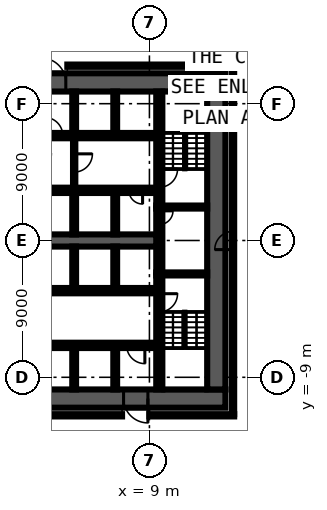
"""IFC4 building model, lengths in metres.
Left out: names, types, materials, properties, quantities, classifications, styles, units other than length and angle.
Written with IfcOpenShell. Run it as: python <this file> out.ifc"""

import sys

from ifc_helpers import new_model, si_unit, direction, frame, frame_2d, origin, place, context, subcontext, project, spatial, rectangle, extrude, element, fill, save


model = new_model("IFC4")
c1 = context("Model", 3, precision=1e-05, world=origin(), true_north=direction((0.0, 1.0)))
c2 = subcontext(c1, "Body", "Model", "MODEL_VIEW")
j1 = project(units=[si_unit("LENGTHUNIT", "METRE"), si_unit("PLANEANGLEUNIT", "RADIAN")], contexts=[c1])
p1 = place(None, origin())
s1 = spatial("IfcSite", under=j1, at=p1, CompositionType="ELEMENT")
p2 = place(p1, origin())
s2 = spatial("IfcBuilding", under=s1, at=p2, CompositionType="ELEMENT")
p3 = place(p2, frame((0.0, 0.0, -11.5)))
s3 = spatial("IfcBuildingStorey", under=s2, at=p3, CompositionType="ELEMENT", Elevation=-11.5)
p4 = place(p3, frame((-14.575, -11.5, 0.0), z_axis=(0.0, 0.0, 1.0), x_axis=(1.0, 0.0, 0.0)))
e1 = element("IfcWall", 1, at=p4, inside=s3, PredefinedType="PARTITIONING", context=c2, shape_type="SweptSolid", body=[
    extrude(rectangle(XDim=21.775, YDim=0.15, at=frame_2d((10.887, 0.0))), origin(), (0.0, 0.0, 1.0), 5.1),
])
p5 = place(p3, frame((9.0, -11.5, 0.0), z_axis=(0.0, 0.0, 1.0), x_axis=(1.0, 0.0, 0.0)))
e2 = element("IfcWall", 2, at=p5, inside=s3, PredefinedType="PARTITIONING", context=c2, shape_type="SweptSolid", body=[
    extrude(rectangle(XDim=5.575, YDim=0.15, at=frame_2d((2.788, 0.0))), origin(), (0.0, 0.0, 1.0), 5.1),
])
p6 = place(p3, frame((3.6, 11.5, 0.0), z_axis=(0.0, 0.0, 1.0), x_axis=(1.0, 0.0, 0.0)))
e3 = element("IfcWall", 3, at=p6, inside=s3, PredefinedType="PARTITIONING", context=c2, shape_type="SweptSolid", body=[
    extrude(rectangle(XDim=10.975, YDim=0.15, at=frame_2d((5.487, 0.0))), origin(), (0.0, 0.0, 1.0), 5.1),
])
p7 = place(p3, frame((14.5, -11.425, 0.0), z_axis=(0.0, 0.0, 1.0), x_axis=(0.0, 1.0, 0.0)))
e4 = element("IfcWall", 4, at=p7, inside=s3, PredefinedType="PARTITIONING", context=c2, shape_type="SweptSolid", body=[
    extrude(rectangle(XDim=22.85, YDim=0.15, at=frame_2d((11.425, 0.0))), origin(), (0.0, 0.0, 1.0), 5.1),
])
p8 = place(p7, frame((10.825, 0.0, 0.0)))
e5 = element("IfcOpeningElement", 5, at=p8, cuts=e4, PredefinedType="OPENING", context=c2, shape_type="SweptSolid", body=[
    extrude(rectangle(XDim=1.2, YDim=2.1, at=frame_2d((0.6, 1.05))), frame((0.0, 0.085, 0.0), z_axis=(0.0, -1.0, 0.0), x_axis=(1.0, 0.0, 0.0)), (0.0, 0.0, 1.0), 0.17),
])
p9 = place(p3, frame((-14.0, 10.4, 0.0), z_axis=(0.0, 0.0, 1.0), x_axis=(1.0, 0.0, 0.0)))
e6 = element("IfcWall", 6, at=p9, inside=s3, PredefinedType="SHEAR", context=c2, shape_type="SweptSolid", body=[
    extrude(rectangle(XDim=28.0, YDim=1.2, at=frame_2d((14.0, 0.0))), origin(), (0.0, 0.0, 1.0), 5.1),
])
p10 = place(p9, frame((15.9, 0.0, 0.0)))
e7 = element("IfcOpeningElement", 7, at=p10, cuts=e6, PredefinedType="OPENING", context=c2, shape_type="SweptSolid", body=[
    extrude(rectangle(XDim=1.6, YDim=2.1, at=frame_2d((0.8, 1.05))), frame((0.0, 0.61, 0.0), z_axis=(0.0, -1.0, 0.0), x_axis=(1.0, 0.0, 0.0)), (0.0, 0.0, 1.0), 1.22),
])
p11 = place(p3, frame((14.0, -10.4, 0.0), z_axis=(0.0, 0.0, 1.0), x_axis=(-1.0, 0.0, 0.0)))
e8 = element("IfcWall", 8, at=p11, inside=s3, PredefinedType="SHEAR", context=c2, shape_type="SweptSolid", body=[
    extrude(rectangle(XDim=28.0, YDim=1.2, at=frame_2d((14.0, 0.0))), origin(), (0.0, 0.0, 1.0), 5.1),
])
p12 = place(p11, frame((5.1, 0.0, 0.0)))
e9 = element("IfcOpeningElement", 9, at=p12, cuts=e8, PredefinedType="OPENING", context=c2, shape_type="SweptSolid", body=[
    extrude(rectangle(XDim=1.6, YDim=2.1, at=frame_2d((0.8, 1.05))), frame((0.0, 0.61, 0.0), z_axis=(0.0, -1.0, 0.0), x_axis=(1.0, 0.0, 0.0)), (0.0, 0.0, 1.0), 1.22),
])
p13 = place(p3, frame((13.4, 9.8, 0.0), z_axis=(0.0, 0.0, 1.0), x_axis=(0.0, -1.0, 0.0)))
e10 = element("IfcWall", 10, at=p13, inside=s3, PredefinedType="SHEAR", context=c2, shape_type="SweptSolid", body=[
    extrude(rectangle(XDim=19.6, YDim=1.2, at=frame_2d((9.8, 0.0))), origin(), (0.0, 0.0, 1.0), 5.1),
])
p14 = place(p3, frame((9.65, -2.3, 0.0), z_axis=(0.0, 0.0, 1.0), x_axis=(0.0, -1.0, 0.0)))
e11 = element("IfcWall", 11, at=p14, inside=s3, PredefinedType="SHEAR", context=c2, shape_type="SweptSolid", body=[
    extrude(rectangle(XDim=7.5, YDim=0.4, at=frame_2d((3.75, 0.0))), origin(), (0.0, 0.0, 1.0), 5.1),
])
p15 = place(p14, frame((1.2, 0.0, 0.0)))
e12 = element("IfcOpeningElement", 12, at=p15, cuts=e11, PredefinedType="OPENING", context=c2, shape_type="SweptSolid", body=[
    extrude(rectangle(XDim=1.2, YDim=2.1, at=frame_2d((0.6, 1.05))), frame((0.0, 0.21, 0.0), z_axis=(0.0, -1.0, 0.0), x_axis=(1.0, 0.0, 0.0)), (0.0, 0.0, 1.0), 0.42),
])
p16 = place(p3, frame((9.65, 2.1, 0.0), z_axis=(0.0, 0.0, 1.0), x_axis=(0.0, -1.0, 0.0)))
e13 = element("IfcWall", 13, at=p16, inside=s3, PredefinedType="SHEAR", context=c2, shape_type="SweptSolid", body=[
    extrude(rectangle(XDim=4.2, YDim=0.4, at=frame_2d((2.1, 0.0))), origin(), (0.0, 0.0, 1.0), 5.1),
])
p17 = place(p16, frame((0.15, 0.0, 0.0)))
e14 = element("IfcOpeningElement", 14, at=p17, cuts=e13, PredefinedType="OPENING", context=c2, shape_type="SweptSolid", body=[
    extrude(rectangle(XDim=0.9, YDim=2.1, at=frame_2d((0.45, 1.05))), frame((0.0, 0.21, 0.0), z_axis=(0.0, -1.0, 0.0), x_axis=(1.0, 0.0, 0.0)), (0.0, 0.0, 1.0), 0.42),
])
p18 = place(p3, frame((9.65, 9.8, 0.0), z_axis=(0.0, 0.0, 1.0), x_axis=(0.0, -1.0, 0.0)))
e15 = element("IfcWall", 15, at=p18, inside=s3, PredefinedType="SHEAR", context=c2, shape_type="SweptSolid", body=[
    extrude(rectangle(XDim=7.5, YDim=0.4, at=frame_2d((3.75, 0.0))), origin(), (0.0, 0.0, 1.0), 5.1),
])
p19 = place(p18, frame((5.1, 0.0, 0.0)))
e16 = element("IfcOpeningElement", 16, at=p19, cuts=e15, PredefinedType="OPENING", context=c2, shape_type="SweptSolid", body=[
    extrude(rectangle(XDim=1.2, YDim=2.1, at=frame_2d((0.6, 1.05))), frame((0.0, 0.21, 0.0), z_axis=(0.0, -1.0, 0.0), x_axis=(1.0, 0.0, 0.0)), (0.0, 0.0, 1.0), 0.42),
])
for number, where, z_axis, x_axis in (
    (17, (9.45, 2.2, 0.0), (0.0, 0.0, 1.0), (1.0, 0.0, 0.0)),
    (18, (9.45, -2.2, 0.0), (0.0, 0.0, 1.0), (1.0, 0.0, 0.0)),
):
    element("IfcWall", number, at=place(p3, frame(where, z_axis=z_axis, x_axis=x_axis)), inside=s3, PredefinedType="SHEAR", context=c2, shape_type="SweptSolid", body=[
        extrude(rectangle(XDim=3.35, YDim=0.2, at=frame_2d((1.675, 0.0))), origin(), (0.0, 0.0, 1.0), 5.1),
    ])
p20 = place(p3, frame((-9.45, 6.9, 0.0), z_axis=(0.0, 0.0, 1.0), x_axis=(1.0, 0.0, 0.0)))
e19 = element("IfcWall", 19, at=p20, inside=s3, PredefinedType="SHEAR", context=c2, shape_type="SweptSolid", body=[
    extrude(rectangle(XDim=18.9, YDim=0.35, at=frame_2d((9.45, 0.0))), origin(), (0.0, 0.0, 1.0), 5.1),
])
p21 = place(p20, frame((0.8, 0.0, 0.0)))
e20 = element("IfcOpeningElement", 20, at=p21, cuts=e19, PredefinedType="OPENING", context=c2, shape_type="SweptSolid", body=[
    extrude(rectangle(XDim=1.1, YDim=2.1, at=frame_2d((0.55, 1.05))), frame((0.0, 0.185, 0.0), z_axis=(0.0, -1.0, 0.0), x_axis=(1.0, 0.0, 0.0)), (0.0, 0.0, 1.0), 0.37),
])
p22 = place(p20, frame((3.5, 0.0, 0.0)))
e21 = element("IfcOpeningElement", 21, at=p22, cuts=e19, PredefinedType="OPENING", context=c2, shape_type="SweptSolid", body=[
    extrude(rectangle(XDim=1.1, YDim=2.1, at=frame_2d((0.55, 1.05))), frame((0.0, 0.185, 0.0), z_axis=(0.0, -1.0, 0.0), x_axis=(1.0, 0.0, 0.0)), (0.0, 0.0, 1.0), 0.37),
])
p23 = place(p20, frame((6.2, 0.0, 0.0)))
e22 = element("IfcOpeningElement", 22, at=p23, cuts=e19, PredefinedType="OPENING", context=c2, shape_type="SweptSolid", body=[
    extrude(rectangle(XDim=1.1, YDim=2.1, at=frame_2d((0.55, 1.05))), frame((0.0, 0.185, 0.0), z_axis=(0.0, -1.0, 0.0), x_axis=(1.0, 0.0, 0.0)), (0.0, 0.0, 1.0), 0.37),
])
p24 = place(p20, frame((8.9, 0.0, 0.0)))
e23 = element("IfcOpeningElement", 23, at=p24, cuts=e19, PredefinedType="OPENING", context=c2, shape_type="SweptSolid", body=[
    extrude(rectangle(XDim=1.1, YDim=2.1, at=frame_2d((0.55, 1.05))), frame((0.0, 0.185, 0.0), z_axis=(0.0, -1.0, 0.0), x_axis=(1.0, 0.0, 0.0)), (0.0, 0.0, 1.0), 0.37),
])
p25 = place(p20, frame((11.55, 0.0, 0.0)))
e24 = element("IfcOpeningElement", 24, at=p25, cuts=e19, PredefinedType="OPENING", context=c2, shape_type="SweptSolid", body=[
    extrude(rectangle(XDim=1.2, YDim=2.1, at=frame_2d((0.6, 1.05))), frame((0.0, 0.185, 0.0), z_axis=(0.0, -1.0, 0.0), x_axis=(1.0, 0.0, 0.0)), (0.0, 0.0, 1.0), 0.37),
])
p26 = place(p20, frame((14.3, 0.0, 0.0)))
e25 = element("IfcOpeningElement", 25, at=p26, cuts=e19, PredefinedType="OPENING", context=c2, shape_type="SweptSolid", body=[
    extrude(rectangle(XDim=1.1, YDim=2.1, at=frame_2d((0.55, 1.05))), frame((0.0, 0.185, 0.0), z_axis=(0.0, -1.0, 0.0), x_axis=(1.0, 0.0, 0.0)), (0.0, 0.0, 1.0), 0.37),
])
p27 = place(p20, frame((17.0, 0.0, 0.0)))
e26 = element("IfcOpeningElement", 26, at=p27, cuts=e19, PredefinedType="OPENING", context=c2, shape_type="SweptSolid", body=[
    extrude(rectangle(XDim=1.1, YDim=2.1, at=frame_2d((0.55, 1.05))), frame((0.0, 0.185, 0.0), z_axis=(0.0, -1.0, 0.0), x_axis=(1.0, 0.0, 0.0)), (0.0, 0.0, 1.0), 0.37),
])
p28 = place(p3, frame((9.45, 3.3, 0.0), z_axis=(0.0, 0.0, 1.0), x_axis=(-1.0, 0.0, 0.0)))
e27 = element("IfcWall", 27, at=p28, inside=s3, PredefinedType="SHEAR", context=c2, shape_type="SweptSolid", body=[
    extrude(rectangle(XDim=18.9, YDim=0.35, at=frame_2d((9.45, 0.0))), origin(), (0.0, 0.0, 1.0), 5.1),
])
p29 = place(p28, frame((6.2, 0.0, 0.0)))
e28 = element("IfcOpeningElement", 28, at=p29, cuts=e27, PredefinedType="OPENING", context=c2, shape_type="SweptSolid", body=[
    extrude(rectangle(XDim=1.1, YDim=2.1, at=frame_2d((0.55, 1.05))), frame((0.0, 0.185, 0.0), z_axis=(0.0, -1.0, 0.0), x_axis=(1.0, 0.0, 0.0)), (0.0, 0.0, 1.0), 0.37),
])
p30 = place(p28, frame((3.5, 0.0, 0.0)))
e29 = element("IfcOpeningElement", 29, at=p30, cuts=e27, PredefinedType="OPENING", context=c2, shape_type="SweptSolid", body=[
    extrude(rectangle(XDim=1.1, YDim=2.1, at=frame_2d((0.55, 1.05))), frame((0.0, 0.185, 0.0), z_axis=(0.0, -1.0, 0.0), x_axis=(1.0, 0.0, 0.0)), (0.0, 0.0, 1.0), 0.37),
])
p31 = place(p28, frame((0.9, 0.0, 0.0)))
e30 = element("IfcOpeningElement", 30, at=p31, cuts=e27, PredefinedType="OPENING", context=c2, shape_type="SweptSolid", body=[
    extrude(rectangle(XDim=0.9, YDim=2.1, at=frame_2d((0.45, 1.05))), frame((0.0, 0.185, 0.0), z_axis=(0.0, -1.0, 0.0), x_axis=(1.0, 0.0, 0.0)), (0.0, 0.0, 1.0), 0.37),
])
p32 = place(p3, frame((-9.45, -3.3, 0.0), z_axis=(0.0, 0.0, 1.0), x_axis=(1.0, 0.0, 0.0)))
e31 = element("IfcWall", 31, at=p32, inside=s3, PredefinedType="SHEAR", context=c2, shape_type="SweptSolid", body=[
    extrude(rectangle(XDim=18.9, YDim=0.35, at=frame_2d((9.45, 0.0))), origin(), (0.0, 0.0, 1.0), 5.1),
])
p33 = place(p32, frame((17.0, 0.0, 0.0)))
e32 = element("IfcOpeningElement", 32, at=p33, cuts=e31, PredefinedType="OPENING", context=c2, shape_type="SweptSolid", body=[
    extrude(rectangle(XDim=1.1, YDim=2.1, at=frame_2d((0.55, 1.05))), frame((0.0, 0.185, 0.0), z_axis=(0.0, -1.0, 0.0), x_axis=(1.0, 0.0, 0.0)), (0.0, 0.0, 1.0), 0.37),
])
p34 = place(p32, frame((0.9, 0.0, 0.0)))
e33 = element("IfcOpeningElement", 33, at=p34, cuts=e31, PredefinedType="OPENING", context=c2, shape_type="SweptSolid", body=[
    extrude(rectangle(XDim=0.9, YDim=2.1, at=frame_2d((0.45, 1.05))), frame((0.0, 0.185, 0.0), z_axis=(0.0, -1.0, 0.0), x_axis=(1.0, 0.0, 0.0)), (0.0, 0.0, 1.0), 0.37),
])
p35 = place(p32, frame((3.6, 0.0, 0.0)))
e34 = element("IfcOpeningElement", 34, at=p35, cuts=e31, PredefinedType="OPENING", context=c2, shape_type="SweptSolid", body=[
    extrude(rectangle(XDim=0.9, YDim=2.1, at=frame_2d((0.45, 1.05))), frame((0.0, 0.185, 0.0), z_axis=(0.0, -1.0, 0.0), x_axis=(1.0, 0.0, 0.0)), (0.0, 0.0, 1.0), 0.37),
])
p36 = place(p32, frame((7.65, 0.0, 0.0)))
e35 = element("IfcOpeningElement", 35, at=p36, cuts=e31, PredefinedType="OPENING", context=c2, shape_type="SweptSolid", body=[
    extrude(rectangle(XDim=0.9, YDim=2.1, at=frame_2d((0.45, 1.05))), frame((0.0, 0.185, 0.0), z_axis=(0.0, -1.0, 0.0), x_axis=(1.0, 0.0, 0.0)), (0.0, 0.0, 1.0), 0.37),
])
p37 = place(p3, frame((9.45, -6.9, 0.0), z_axis=(0.0, 0.0, 1.0), x_axis=(-1.0, 0.0, 0.0)))
e36 = element("IfcWall", 36, at=p37, inside=s3, PredefinedType="SHEAR", context=c2, shape_type="SweptSolid", body=[
    extrude(rectangle(XDim=18.9, YDim=0.35, at=frame_2d((9.45, 0.0))), origin(), (0.0, 0.0, 1.0), 5.1),
])
p38 = place(p37, frame((0.75, 0.0, 0.0)))
e37 = element("IfcOpeningElement", 37, at=p38, cuts=e36, PredefinedType="OPENING", context=c2, shape_type="SweptSolid", body=[
    extrude(rectangle(XDim=1.2, YDim=2.1, at=frame_2d((0.6, 1.05))), frame((0.0, 0.185, 0.0), z_axis=(0.0, -1.0, 0.0), x_axis=(1.0, 0.0, 0.0)), (0.0, 0.0, 1.0), 0.37),
])
p39 = place(p37, frame((14.4, 0.0, 0.0)))
e38 = element("IfcOpeningElement", 38, at=p39, cuts=e36, PredefinedType="OPENING", context=c2, shape_type="SweptSolid", body=[
    extrude(rectangle(XDim=0.9, YDim=2.1, at=frame_2d((0.45, 1.05))), frame((0.0, 0.185, 0.0), z_axis=(0.0, -1.0, 0.0), x_axis=(1.0, 0.0, 0.0)), (0.0, 0.0, 1.0), 0.37),
])
p40 = place(p37, frame((9.0, 0.0, 0.0)))
e39 = element("IfcOpeningElement", 39, at=p40, cuts=e36, PredefinedType="OPENING", context=c2, shape_type="SweptSolid", body=[
    extrude(rectangle(XDim=0.9, YDim=2.1, at=frame_2d((0.45, 1.05))), frame((0.0, 0.185, 0.0), z_axis=(0.0, -1.0, 0.0), x_axis=(1.0, 0.0, 0.0)), (0.0, 0.0, 1.0), 0.37),
])
p41 = place(p3, frame((-9.45, 0.0, 0.0), z_axis=(0.0, 0.0, 1.0), x_axis=(1.0, 0.0, 0.0)))
e40 = element("IfcWall", 40, at=p41, inside=s3, PredefinedType="SHEAR", context=c2, shape_type="SweptSolid", body=[
    extrude(rectangle(XDim=18.9, YDim=0.8, at=frame_2d((9.45, 0.0))), origin(), (0.0, 0.0, 1.0), 5.1),
])
for number, where, z_axis, x_axis in (
    (41, (6.75, -9.8, 0.0), (0.0, 0.0, 1.0), (0.0, 1.0, 0.0)),
    (42, (6.75, -3.125, 0.0), (0.0, 0.0, 1.0), (0.0, 1.0, 0.0)),
):
    element("IfcWall", number, at=place(p3, frame(where, z_axis=z_axis, x_axis=x_axis)), inside=s3, PredefinedType="SHEAR", context=c2, shape_type="SweptSolid", body=[
        extrude(rectangle(XDim=2.725, YDim=0.25, at=frame_2d((1.363, 0.0))), origin(), (0.0, 0.0, 1.0), 5.1),
    ])
for number, where, z_axis, x_axis in (
    (43, (6.75, 0.4, 0.0), (0.0, 0.0, 1.0), (0.0, 1.0, 0.0)),
    (44, (6.75, 7.075, 0.0), (0.0, 0.0, 1.0), (0.0, 1.0, 0.0)),
):
    element("IfcWall", number, at=place(p3, frame(where, z_axis=z_axis, x_axis=x_axis)), inside=s3, PredefinedType="SOLIDWALL", context=c2, shape_type="SweptSolid", body=[
        extrude(rectangle(XDim=2.725, YDim=0.25, at=frame_2d((1.363, 0.0))), origin(), (0.0, 0.0, 1.0), 5.1),
    ])
p42 = place(p3, frame((4.05, 6.725, 0.0), z_axis=(0.0, 0.0, 1.0), x_axis=(0.0, -1.0, 0.0)))
e45 = element("IfcWall", 45, at=p42, inside=s3, PredefinedType="PARTITIONING", context=c2, shape_type="SweptSolid", body=[
    extrude(rectangle(XDim=3.25, YDim=0.15, at=frame_2d((1.625, 0.0))), origin(), (0.0, 0.0, 1.0), 5.1),
])
p43 = place(p42, frame((1.025, 0.0, 0.0)))
e46 = element("IfcOpeningElement", 46, at=p43, cuts=e45, PredefinedType="OPENING", context=c2, shape_type="SweptSolid", body=[
    extrude(rectangle(XDim=1.2, YDim=2.1, at=frame_2d((0.6, 1.05))), frame((0.0, 0.085, 0.0), z_axis=(0.0, -1.0, 0.0), x_axis=(1.0, 0.0, 0.0)), (0.0, 0.0, 1.0), 0.17),
])
for number, where, z_axis, x_axis in (
    (47, (4.05, -9.8, 0.0), (0.0, 0.0, 1.0), (0.0, 1.0, 0.0)),
    (48, (4.05, -3.125, 0.0), (0.0, 0.0, 1.0), (0.0, 1.0, 0.0)),
):
    element("IfcWall", number, at=place(p3, frame(where, z_axis=z_axis, x_axis=x_axis)), inside=s3, PredefinedType="SHEAR", context=c2, shape_type="SweptSolid", body=[
        extrude(rectangle(XDim=2.725, YDim=0.25, at=frame_2d((1.363, 0.0))), origin(), (0.0, 0.0, 1.0), 5.1),
    ])
for number, where, z_axis, x_axis in (
    (49, (4.05, 0.4, 0.0), (0.0, 0.0, 1.0), (0.0, 1.0, 0.0)),
    (50, (4.05, 7.075, 0.0), (0.0, 0.0, 1.0), (0.0, 1.0, 0.0)),
):
    element("IfcWall", number, at=place(p3, frame(where, z_axis=z_axis, x_axis=x_axis)), inside=s3, PredefinedType="SOLIDWALL", context=c2, shape_type="SweptSolid", body=[
        extrude(rectangle(XDim=2.725, YDim=0.25, at=frame_2d((1.363, 0.0))), origin(), (0.0, 0.0, 1.0), 5.1),
    ])
p44 = place(p8, origin())
e51 = element("IfcDoor", 51, at=p44, inside=s3, OperationType="SINGLE_SWING_RIGHT", PredefinedType="DOOR", context=c2, shape_type="SweptSolid", body=[
    extrude(rectangle(XDim=1.2, YDim=2.1, at=frame_2d((0.6, 1.05))), frame((0.0, 0.025, 0.0), z_axis=(0.0, -1.0, 0.0), x_axis=(1.0, 0.0, 0.0)), (0.0, 0.0, 1.0), 0.05),
])
fill(e5, e51)
p45 = place(p17, origin())
e52 = element("IfcDoor", 52, at=p45, inside=s3, OperationType="SINGLE_SWING_RIGHT", PredefinedType="DOOR", context=c2, shape_type="SweptSolid", body=[
    extrude(rectangle(XDim=0.9, YDim=2.1, at=frame_2d((0.45, 1.05))), frame((0.0, 0.025, 0.0), z_axis=(0.0, -1.0, 0.0), x_axis=(1.0, 0.0, 0.0)), (0.0, 0.0, 1.0), 0.05),
])
fill(e14, e52)
p46 = place(p10, origin())
e53 = element("IfcDoor", 53, at=p46, inside=s3, OperationType="DOUBLE_DOOR_SINGLE_SWING", PredefinedType="DOOR", context=c2, shape_type="SweptSolid", body=[
    extrude(rectangle(XDim=1.6, YDim=2.1, at=frame_2d((0.8, 1.05))), frame((0.0, 0.025, 0.0), z_axis=(0.0, -1.0, 0.0), x_axis=(1.0, 0.0, 0.0)), (0.0, 0.0, 1.0), 0.05),
])
fill(e7, e53)
p47 = place(p25, origin())
e54 = element("IfcDoor", 54, at=p47, inside=s3, OperationType="SINGLE_SWING_LEFT", PredefinedType="DOOR", context=c2, shape_type="SweptSolid", body=[
    extrude(rectangle(XDim=1.2, YDim=2.1, at=frame_2d((0.6, 1.05))), frame((0.0, 0.025, 0.0), z_axis=(0.0, -1.0, 0.0), x_axis=(1.0, 0.0, 0.0)), (0.0, 0.0, 1.0), 0.05),
])
fill(e24, e54)
p48 = place(p26, origin())
e55 = element("IfcDoor", 55, at=p48, inside=s3, OperationType="DOUBLE_DOOR_SLIDING", PredefinedType="DOOR", context=c2, shape_type="SweptSolid", body=[
    extrude(rectangle(XDim=1.1, YDim=2.1, at=frame_2d((0.55, 1.05))), frame((0.0, 0.025, 0.0), z_axis=(0.0, -1.0, 0.0), x_axis=(1.0, 0.0, 0.0)), (0.0, 0.0, 1.0), 0.05),
])
fill(e25, e55)
p49 = place(p27, origin())
e56 = element("IfcDoor", 56, at=p49, inside=s3, OperationType="DOUBLE_DOOR_SLIDING", PredefinedType="DOOR", context=c2, shape_type="SweptSolid", body=[
    extrude(rectangle(XDim=1.1, YDim=2.1, at=frame_2d((0.55, 1.05))), frame((0.0, 0.025, 0.0), z_axis=(0.0, -1.0, 0.0), x_axis=(1.0, 0.0, 0.0)), (0.0, 0.0, 1.0), 0.05),
])
fill(e26, e56)
p50 = place(p29, origin())
e57 = element("IfcDoor", 57, at=p50, inside=s3, OperationType="DOUBLE_DOOR_SLIDING", PredefinedType="DOOR", context=c2, shape_type="SweptSolid", body=[
    extrude(rectangle(XDim=1.1, YDim=2.1, at=frame_2d((0.55, 1.05))), frame((0.0, 0.025, 0.0), z_axis=(0.0, -1.0, 0.0), x_axis=(1.0, 0.0, 0.0)), (0.0, 0.0, 1.0), 0.05),
])
fill(e28, e57)
p51 = place(p30, origin())
e58 = element("IfcDoor", 58, at=p51, inside=s3, OperationType="DOUBLE_DOOR_SLIDING", PredefinedType="DOOR", context=c2, shape_type="SweptSolid", body=[
    extrude(rectangle(XDim=1.1, YDim=2.1, at=frame_2d((0.55, 1.05))), frame((0.0, 0.025, 0.0), z_axis=(0.0, -1.0, 0.0), x_axis=(1.0, 0.0, 0.0)), (0.0, 0.0, 1.0), 0.05),
])
fill(e29, e58)
p52 = place(p31, origin())
e59 = element("IfcDoor", 59, at=p52, inside=s3, OperationType="SINGLE_SWING_LEFT", PredefinedType="DOOR", context=c2, shape_type="SweptSolid", body=[
    extrude(rectangle(XDim=0.9, YDim=2.1, at=frame_2d((0.45, 1.05))), frame((0.0, 0.025, 0.0), z_axis=(0.0, -1.0, 0.0), x_axis=(1.0, 0.0, 0.0)), (0.0, 0.0, 1.0), 0.05),
])
fill(e30, e59)
p53 = place(p33, origin())
e60 = element("IfcDoor", 60, at=p53, inside=s3, OperationType="DOUBLE_DOOR_SLIDING", PredefinedType="DOOR", context=c2, shape_type="SweptSolid", body=[
    extrude(rectangle(XDim=1.1, YDim=2.1, at=frame_2d((0.55, 1.05))), frame((0.0, 0.025, 0.0), z_axis=(0.0, -1.0, 0.0), x_axis=(1.0, 0.0, 0.0)), (0.0, 0.0, 1.0), 0.05),
])
fill(e32, e60)
p54 = place(p12, origin())
e61 = element("IfcDoor", 61, at=p54, inside=s3, OperationType="DOUBLE_DOOR_SINGLE_SWING", PredefinedType="DOOR", context=c2, shape_type="SweptSolid", body=[
    extrude(rectangle(XDim=1.6, YDim=2.1, at=frame_2d((0.8, 1.05))), frame((0.0, 0.025, 0.0), z_axis=(0.0, -1.0, 0.0), x_axis=(1.0, 0.0, 0.0)), (0.0, 0.0, 1.0), 0.05),
])
fill(e9, e61)
p55 = place(p38, origin())
e62 = element("IfcDoor", 62, at=p55, inside=s3, OperationType="SINGLE_SWING_LEFT", PredefinedType="DOOR", context=c2, shape_type="SweptSolid", body=[
    extrude(rectangle(XDim=1.2, YDim=2.1, at=frame_2d((0.6, 1.05))), frame((0.0, 0.025, 0.0), z_axis=(0.0, -1.0, 0.0), x_axis=(1.0, 0.0, 0.0)), (0.0, 0.0, 1.0), 0.05),
])
fill(e37, e62)
p56 = place(p19, origin())
e63 = element("IfcDoor", 63, at=p56, inside=s3, OperationType="SINGLE_SWING_LEFT", PredefinedType="DOOR", context=c2, shape_type="SweptSolid", body=[
    extrude(rectangle(XDim=1.2, YDim=2.1, at=frame_2d((0.6, 1.05))), frame((0.0, 0.025, 0.0), z_axis=(0.0, -1.0, 0.0), x_axis=(1.0, 0.0, 0.0)), (0.0, 0.0, 1.0), 0.05),
])
fill(e16, e63)
p57 = place(p15, origin())
e64 = element("IfcDoor", 64, at=p57, inside=s3, OperationType="SINGLE_SWING_RIGHT", PredefinedType="DOOR", context=c2, shape_type="SweptSolid", body=[
    extrude(rectangle(XDim=1.2, YDim=2.1, at=frame_2d((0.6, 1.05))), frame((0.0, 0.025, 0.0), z_axis=(0.0, -1.0, 0.0), x_axis=(1.0, 0.0, 0.0)), (0.0, 0.0, 1.0), 0.05),
])
fill(e12, e64)
p58 = place(p43, origin())
e65 = element("IfcDoor", 65, at=p58, inside=s3, OperationType="SINGLE_SWING_RIGHT", PredefinedType="DOOR", context=c2, shape_type="SweptSolid", body=[
    extrude(rectangle(XDim=1.2, YDim=2.1, at=frame_2d((0.6, 1.05))), frame((0.0, 0.025, 0.0), z_axis=(0.0, -1.0, 0.0), x_axis=(1.0, 0.0, 0.0)), (0.0, 0.0, 1.0), 0.05),
])
fill(e46, e65)
save(model, sys.argv[1])
